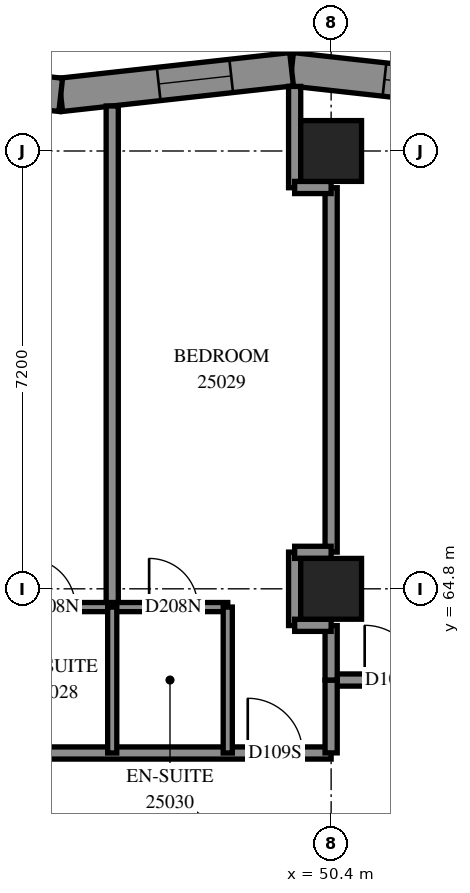
"""IFC4 building model, lengths in metres.
Left out: names, types, materials, properties, quantities, classifications, styles, units other than length and angle.
Written with IfcOpenShell. Run it as: python <this file> out.ifc"""

import sys

from ifc_helpers import new_model, si_unit, direction, frame, frame_2d, origin, origin_2d, place, context, subcontext, project, spatial, polyline, rectangle, outline, extrude, element, fill, save


model = new_model("IFC4")
c1 = context("Model", 3, precision=1e-05, world=origin(), true_north=direction((0.0, 1.0)))
c2 = subcontext(c1, "Body", "Model", "MODEL_VIEW")
j1 = project(units=[si_unit("LENGTHUNIT", "METRE"), si_unit("PLANEANGLEUNIT", "RADIAN")], contexts=[c1])
p1 = place(None, origin())
s1 = spatial("IfcSite", under=j1, at=p1, CompositionType="ELEMENT")
p2 = place(p1, origin())
s2 = spatial("IfcBuilding", under=s1, at=p2, CompositionType="ELEMENT")
p3 = place(p2, frame((0.0, 0.0, 94.8)))
s3 = spatial("IfcBuildingStorey", under=s2, at=p3, CompositionType="ELEMENT", Elevation=94.8)
for number, where, z_axis, x_axis in (
    (1, (50.4, 64.8, 0.0), (0.0, 0.0, 1.0), (1.0, 0.0, 0.0)),
    (2, (50.4, 72.0, 0.0), (0.0, 0.0, 1.0), (1.0, 0.0, 0.0)),
):
    element("IfcColumn", number, at=place(p3, frame(where, z_axis=z_axis, x_axis=x_axis)), inside=s3, PredefinedType="COLUMN", context=c2, shape_type="SweptSolid", body=[
        extrude(rectangle(XDim=1.0, YDim=1.0, at=origin_2d()), origin(), (0.0, 0.0, 1.0), 3.1),
    ])
p4 = place(p3, frame((53.546, 72.923, 0.0), z_axis=(0.0, 0.0, 1.0), x_axis=(-0.99390702, 0.1102217568, 0.0)))
e3 = element("IfcWall", 3, at=p4, inside=s3, PredefinedType="SOLIDWALL", context=c2, shape_type="SweptSolid", body=[
    extrude(outline(polyline([(0.03, -0.275), (3.85, -0.275), (3.789, 0.275), (-0.03, 0.275), (0.03, -0.275)])), origin(), (0.0, 0.0, 1.0), 3.1),
])
p5 = place(p4, frame((1.083, 0.0, 0.5)))
e4 = element("IfcOpeningElement", 4, at=p5, cuts=e3, PredefinedType="OPENING", context=c2, shape_type="SweptSolid", body=[
    extrude(rectangle(XDim=1.2, YDim=2.45, at=frame_2d((0.6, 1.225))), frame((0.0, 0.285, 0.0), z_axis=(0.0, -1.0, 0.0), x_axis=(1.0, 0.0, 0.0)), (0.0, 0.0, 1.0), 0.57),
])
p6 = place(p3, frame((49.749, 73.344, 0.0), z_axis=(0.0, 0.0, 1.0), x_axis=(-0.99390702, -0.1102217568, 0.0)))
e5 = element("IfcWall", 5, at=p6, inside=s3, PredefinedType="SOLIDWALL", context=c2, shape_type="SweptSolid", body=[
    extrude(outline(polyline([(-0.03, -0.275), (3.789, -0.275), (3.85, 0.275), (0.03, 0.275), (-0.03, -0.275)])), origin(), (0.0, 0.0, 1.0), 3.1),
])
p7 = place(p6, frame((0.999, 0.0, 0.5)))
e6 = element("IfcOpeningElement", 6, at=p7, cuts=e5, PredefinedType="OPENING", context=c2, shape_type="SweptSolid", body=[
    extrude(rectangle(XDim=1.2, YDim=2.45, at=frame_2d((0.6, 1.225))), frame((0.0, 0.285, 0.0), z_axis=(0.0, -1.0, 0.0), x_axis=(1.0, 0.0, 0.0)), (0.0, 0.0, 1.0), 0.57),
])
p8 = place(p3, frame((45.953, 72.923, 0.0), z_axis=(0.0, 0.0, 1.0), x_axis=(-0.99390702, 0.1102217568, 0.0)))
e7 = element("IfcWall", 7, at=p8, inside=s3, PredefinedType="SOLIDWALL", context=c2, shape_type="SweptSolid", body=[
    extrude(outline(polyline([(0.03, -0.275), (3.85, -0.275), (3.789, 0.275), (-0.03, 0.275), (0.03, -0.275)])), origin(), (0.0, 0.0, 1.0), 3.1),
])
p9 = place(p8, frame((0.885, 0.0, 0.5)))
e8 = element("IfcOpeningElement", 8, at=p9, cuts=e7, PredefinedType="OPENING", context=c2, shape_type="SweptSolid", body=[
    extrude(rectangle(XDim=1.2, YDim=2.45, at=frame_2d((0.6, 1.225))), frame((0.0, 0.285, 0.0), z_axis=(0.0, -1.0, 0.0), x_axis=(1.0, 0.0, 0.0)), (0.0, 0.0, 1.0), 0.57),
])
p10 = place(p3, frame((33.3, 62.1, 0.0), z_axis=(0.0, 0.0, 1.0), x_axis=(1.0, 0.0, 0.0)))
e9 = element("IfcWall", 9, at=p10, inside=s3, PredefinedType="PARTITIONING", context=c2, shape_type="SweptSolid", body=[
    extrude(rectangle(XDim=17.1, YDim=0.2, at=frame_2d((8.55, 0.0))), origin(), (0.0, 0.0, 1.0), 3.1),
])
p11 = place(p10, frame((6.258, 0.0, 0.0)))
e10 = element("IfcOpeningElement", 10, at=p11, cuts=e9, PredefinedType="OPENING", context=c2, shape_type="SweptSolid", body=[
    extrude(rectangle(XDim=1.0, YDim=2.1, at=frame_2d((0.5, 1.05))), frame((0.0, 0.11, 0.0), z_axis=(0.0, -1.0, 0.0), x_axis=(1.0, 0.0, 0.0)), (0.0, 0.0, 1.0), 0.22),
])
p12 = place(p10, frame((10.148, 0.0, 0.0)))
e11 = element("IfcOpeningElement", 11, at=p12, cuts=e9, PredefinedType="OPENING", context=c2, shape_type="SweptSolid", body=[
    extrude(rectangle(XDim=0.9, YDim=2.1, at=frame_2d((0.45, 1.05))), frame((0.0, 0.11, 0.0), z_axis=(0.0, -1.0, 0.0), x_axis=(1.0, 0.0, 0.0)), (0.0, 0.0, 1.0), 0.22),
])
p13 = place(p10, frame((15.729, 0.0, 0.0)))
e12 = element("IfcOpeningElement", 12, at=p13, cuts=e9, PredefinedType="OPENING", context=c2, shape_type="SweptSolid", body=[
    extrude(rectangle(XDim=0.9, YDim=2.1, at=frame_2d((0.45, 1.05))), frame((0.0, 0.11, 0.0), z_axis=(0.0, -1.0, 0.0), x_axis=(1.0, 0.0, 0.0)), (0.0, 0.0, 1.0), 0.22),
])
p14 = place(p3, frame((46.8, 64.5, 0.0), z_axis=(0.0, 0.0, 1.0), x_axis=(0.0, 1.0, 0.0)))
e13 = element("IfcWall", 13, at=p14, inside=s3, PredefinedType="PARTITIONING", context=c2, shape_type="SweptSolid", body=[
    extrude(rectangle(XDim=8.241, YDim=0.2, at=frame_2d((4.12, 0.0))), origin(), (0.0, 0.0, 1.0), 3.1),
])
p15 = place(p3, frame((50.4, 65.404, 0.0), z_axis=(0.0, 0.0, 1.0), x_axis=(0.0, 1.0, 0.0)))
e14 = element("IfcWall", 14, at=p15, inside=s3, PredefinedType="PARTITIONING", context=c2, shape_type="SweptSolid", body=[
    extrude(rectangle(XDim=5.992, YDim=0.2, at=frame_2d((2.996, 0.0))), origin(), (0.0, 0.0, 1.0), 3.1),
])
p16 = place(p3, frame((50.4, 63.3, 0.0), z_axis=(0.0, 0.0, 1.0), x_axis=(1.0, 0.0, 0.0)))
e15 = element("IfcWall", 15, at=p16, inside=s3, PredefinedType="PARTITIONING", context=c2, shape_type="SweptSolid", body=[
    extrude(rectangle(XDim=4.3, YDim=0.2, at=frame_2d((2.15, 0.0))), origin(), (0.0, 0.0, 1.0), 3.1),
])
p17 = place(p16, frame((0.552, 0.0, 0.0)))
e16 = element("IfcOpeningElement", 16, at=p17, cuts=e15, PredefinedType="OPENING", context=c2, shape_type="SweptSolid", body=[
    extrude(rectangle(XDim=0.9, YDim=2.1, at=frame_2d((0.45, 1.05))), frame((0.0, 0.11, 0.0), z_axis=(0.0, -1.0, 0.0), x_axis=(1.0, 0.0, 0.0)), (0.0, 0.0, 1.0), 0.22),
])
p18 = place(p3, frame((44.9, 64.5, 0.0), z_axis=(0.0, 0.0, 1.0), x_axis=(1.0, 0.0, 0.0)))
e17 = element("IfcWall", 17, at=p18, inside=s3, PredefinedType="PARTITIONING", context=c2, shape_type="SweptSolid", body=[
    extrude(rectangle(XDim=3.8, YDim=0.15, at=frame_2d((1.9, 0.0))), origin(), (0.0, 0.0, 1.0), 3.1),
])
p19 = place(p18, frame((0.493, 0.0, 0.0)))
e18 = element("IfcOpeningElement", 18, at=p19, cuts=e17, PredefinedType="OPENING", context=c2, shape_type="SweptSolid", body=[
    extrude(rectangle(XDim=0.8, YDim=2.1, at=frame_2d((0.4, 1.05))), frame((0.0, 0.085, 0.0), z_axis=(0.0, -1.0, 0.0), x_axis=(1.0, 0.0, 0.0)), (0.0, 0.0, 1.0), 0.17),
])
p20 = place(p18, frame((2.507, 0.0, 0.0)))
e19 = element("IfcOpeningElement", 19, at=p20, cuts=e17, PredefinedType="OPENING", context=c2, shape_type="SweptSolid", body=[
    extrude(rectangle(XDim=0.8, YDim=2.1, at=frame_2d((0.4, 1.05))), frame((0.0, 0.085, 0.0), z_axis=(0.0, -1.0, 0.0), x_axis=(1.0, 0.0, 0.0)), (0.0, 0.0, 1.0), 0.17),
])
for number, where, z_axis, x_axis in (
    (20, (46.8, 62.1, 0.0), (0.0, 0.0, 1.0), (0.0, 1.0, 0.0)),
    (21, (48.7, 62.1, 0.0), (0.0, 0.0, 1.0), (0.0, 1.0, 0.0)),
):
    element("IfcWall", number, at=place(p3, frame(where, z_axis=z_axis, x_axis=x_axis)), inside=s3, PredefinedType="PARTITIONING", context=c2, shape_type="SweptSolid", body=[
        extrude(rectangle(XDim=2.4, YDim=0.15, at=frame_2d((1.2, 0.0))), origin(), (0.0, 0.0, 1.0), 3.1),
    ])
p21 = place(p3, frame((49.8, 71.396, 0.0), z_axis=(0.0, 0.0, 1.0), x_axis=(0.0, 1.0, 0.0)))
e22 = element("IfcWall", 22, at=p21, inside=s3, PredefinedType="PARTITIONING", context=c2, shape_type="SweptSolid", body=[
    extrude(rectangle(XDim=1.666, YDim=0.2, at=frame_2d((0.833, 0.0))), origin(), (0.0, 0.0, 1.0), 3.1),
])
p22 = place(p3, frame((49.8, 64.196, 0.0), z_axis=(0.0, 0.0, 1.0), x_axis=(0.0, 1.0, 0.0)))
e23 = element("IfcWall", 23, at=p22, inside=s3, PredefinedType="PARTITIONING", context=c2, shape_type="SweptSolid", body=[
    extrude(rectangle(XDim=1.208, YDim=0.2, at=frame_2d((0.604, 0.0))), origin(), (0.0, 0.0, 1.0), 3.1),
])
p23 = place(p3, frame((50.4, 62.102, 0.0), z_axis=(0.0, 0.0, 1.0), x_axis=(0.0, 1.0, 0.0)))
e24 = element("IfcWall", 24, at=p23, inside=s3, PredefinedType="PARTITIONING", context=c2, shape_type="SweptSolid", body=[
    extrude(rectangle(XDim=1.198, YDim=0.2, at=frame_2d((0.599, 0.0))), origin(), (0.0, 0.0, 1.0), 3.1),
])
p24 = place(p3, frame((50.4, 63.3, 0.0), z_axis=(0.0, 0.0, 1.0), x_axis=(0.0, 1.0, 0.0)))
e25 = element("IfcWall", 25, at=p24, inside=s3, PredefinedType="PARTITIONING", context=c2, shape_type="SweptSolid", body=[
    extrude(rectangle(XDim=0.896, YDim=0.2, at=frame_2d((0.448, 0.0))), origin(), (0.0, 0.0, 1.0), 3.1),
])
for number, where, z_axis, x_axis in (
    (26, (49.8, 71.4, 0.0), (0.0, 0.0, 1.0), (1.0, 0.0, 0.0)),
    (27, (49.8, 65.4, 0.0), (0.0, 0.0, 1.0), (1.0, 0.0, 0.0)),
    (28, (49.8, 64.2, 0.0), (0.0, 0.0, 1.0), (1.0, 0.0, 0.0)),
):
    element("IfcWall", number, at=place(p3, frame(where, z_axis=z_axis, x_axis=x_axis)), inside=s3, PredefinedType="PARTITIONING", context=c2, shape_type="SweptSolid", body=[
        extrude(rectangle(XDim=0.6, YDim=0.2, at=frame_2d((0.3, 0.0))), origin(), (0.0, 0.0, 1.0), 3.1),
    ])
p25 = place(p5, origin())
e29 = element("IfcWindow", 29, at=p25, inside=s3, PartitioningType="SINGLE_PANEL", PredefinedType="WINDOW", context=c2, shape_type="SweptSolid", body=[
    extrude(rectangle(XDim=1.2, YDim=2.45, at=frame_2d((0.6, 1.225))), frame((0.0, 0.155, 0.0), z_axis=(0.0, -1.0, 0.0), x_axis=(1.0, 0.0, 0.0)), (0.0, 0.0, 1.0), 0.06),
])
fill(e4, e29)
p26 = place(p7, origin())
e30 = element("IfcWindow", 30, at=p26, inside=s3, PartitioningType="SINGLE_PANEL", PredefinedType="WINDOW", context=c2, shape_type="SweptSolid", body=[
    extrude(rectangle(XDim=1.2, YDim=2.45, at=frame_2d((0.6, 1.225))), frame((0.0, 0.155, 0.0), z_axis=(0.0, -1.0, 0.0), x_axis=(1.0, 0.0, 0.0)), (0.0, 0.0, 1.0), 0.06),
])
fill(e6, e30)
p27 = place(p19, origin())
e31 = element("IfcDoor", 31, at=p27, inside=s3, OperationType="SINGLE_SWING_RIGHT", PredefinedType="DOOR", context=c2, shape_type="SweptSolid", body=[
    extrude(rectangle(XDim=0.8, YDim=2.1, at=frame_2d((0.4, 1.05))), frame((0.0, 0.025, 0.0), z_axis=(0.0, -1.0, 0.0), x_axis=(1.0, 0.0, 0.0)), (0.0, 0.0, 1.0), 0.05),
])
fill(e18, e31)
p28 = place(p13, origin())
e32 = element("IfcDoor", 32, at=p28, inside=s3, OperationType="SINGLE_SWING_LEFT", PredefinedType="DOOR", context=c2, shape_type="SweptSolid", body=[
    extrude(rectangle(XDim=0.9, YDim=2.1, at=frame_2d((0.45, 1.05))), frame((0.0, 0.025, 0.0), z_axis=(0.0, -1.0, 0.0), x_axis=(1.0, 0.0, 0.0)), (0.0, 0.0, 1.0), 0.05),
])
fill(e12, e32)
p29 = place(p20, origin())
e33 = element("IfcDoor", 33, at=p29, inside=s3, OperationType="SINGLE_SWING_RIGHT", PredefinedType="DOOR", context=c2, shape_type="SweptSolid", body=[
    extrude(rectangle(XDim=0.8, YDim=2.1, at=frame_2d((0.4, 1.05))), frame((0.0, 0.025, 0.0), z_axis=(0.0, -1.0, 0.0), x_axis=(1.0, 0.0, 0.0)), (0.0, 0.0, 1.0), 0.05),
])
fill(e19, e33)
p30 = place(p17, origin())
e34 = element("IfcDoor", 34, at=p30, inside=s3, OperationType="SINGLE_SWING_RIGHT", PredefinedType="DOOR", context=c2, shape_type="SweptSolid", body=[
    extrude(rectangle(XDim=0.9, YDim=2.1, at=frame_2d((0.45, 1.05))), frame((0.0, 0.025, 0.0), z_axis=(0.0, -1.0, 0.0), x_axis=(1.0, 0.0, 0.0)), (0.0, 0.0, 1.0), 0.05),
])
fill(e16, e34)
save(model, sys.argv[1])
